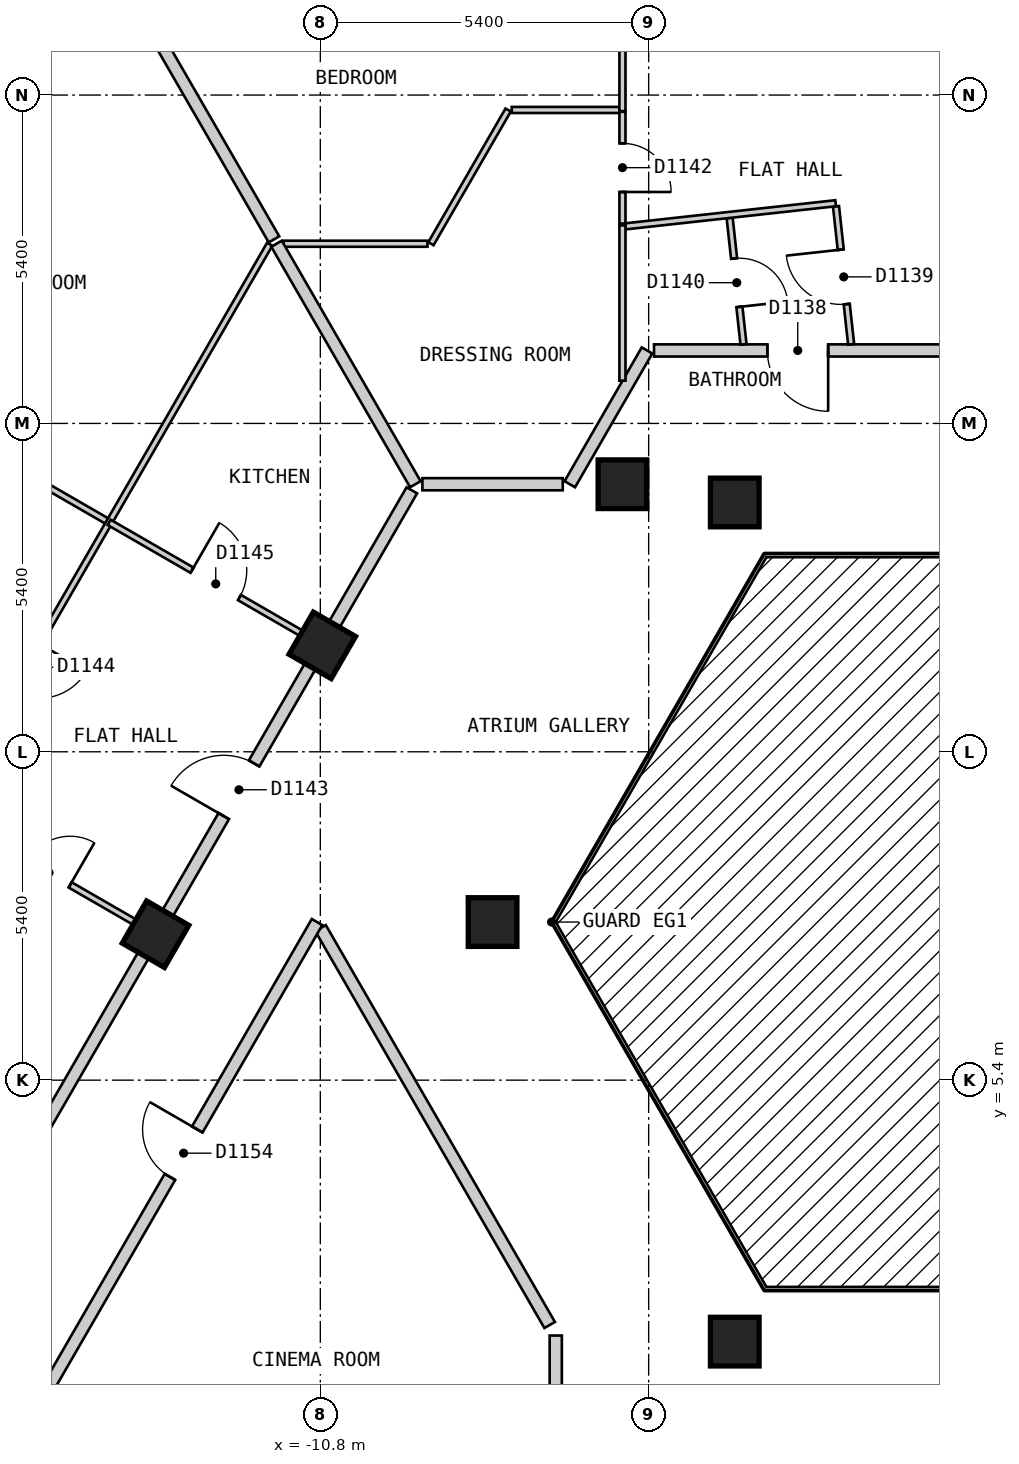
"""IFC4 building model, lengths in metres.
Left out: names, types, materials, properties, quantities, classifications, styles, units other than length and angle.
Written with IfcOpenShell. Run it as: python <this file> out.ifc"""

import sys

from ifc_helpers import new_model, si_unit, direction, frame, frame_2d, origin, origin_2d, place, context, subcontext, project, spatial, rectangle, extrude, element, fill, save


model = new_model("IFC4")
c1 = context("Model", 3, precision=1e-05, world=origin(), true_north=direction((0.0, 1.0)))
c2 = subcontext(c1, "Body", "Model", "MODEL_VIEW")
j1 = project(units=[si_unit("LENGTHUNIT", "METRE"), si_unit("PLANEANGLEUNIT", "RADIAN")], contexts=[c1])
p1 = place(None, origin())
s1 = spatial("IfcSite", under=j1, at=p1, CompositionType="ELEMENT")
p2 = place(p1, origin())
s2 = spatial("IfcBuilding", under=s1, at=p2, CompositionType="ELEMENT")
p3 = place(p2, frame((0.0, 0.0, 144.6)))
s3 = spatial("IfcBuildingStorey", under=s2, at=p3, CompositionType="ELEMENT", Elevation=144.6)
for number, where, z_axis, x_axis in (
    (1, (-3.984, 14.9, 0.0), (0.0, 0.0, 1.0), (1.0, 0.0, 0.0)),
    (2, (-5.831, 15.2, 0.0), (0.0, 0.0, 1.0), (-1.0, 0.0, 0.0)),
    (3, (-10.768, 12.55, 0.0), (0.0, 0.0, 1.0), (-0.5, -0.866, 0.0)),
    (4, (-7.967, 8.0, 0.0), (0.0, 0.0, 1.0), (1.0, 0.0, 0.0)),
    (5, (-13.51, 7.8, 0.0), (0.0, 0.0, 1.0), (-0.5, -0.866, 0.0)),
    (6, (-3.984, 1.1, 0.0), (0.0, 0.0, 1.0), (1.0, 0.0, 0.0)),
):
    element("IfcColumn", number, at=place(p3, frame(where, z_axis=z_axis, x_axis=x_axis)), inside=s3, PredefinedType="COLUMN", context=c2, shape_type="SweptSolid", body=[
        extrude(rectangle(XDim=0.8, YDim=0.8, at=origin_2d()), origin(), (0.0, 0.0, 1.0), 3.0),
    ])
p4 = place(p3, frame((-10.796, 7.9, 0.0), z_axis=(0.0, 0.0, 1.0), x_axis=(0.499954271211, -0.866051803703, 0.0)))
e7 = element("IfcWall", 7, at=p4, inside=s3, PredefinedType="PARTITIONING", context=c2, shape_type="SweptSolid", body=[
    extrude(rectangle(XDim=7.536, YDim=0.2, at=frame_2d((3.768, 0.0))), origin(), (0.0, 0.0, 1.0), 2.7),
])
p5 = place(p3, frame((-9.121, 15.2, 0.0), z_axis=(0.0, 0.0, 1.0), x_axis=(1.0, 0.0, 0.0)))
e8 = element("IfcWall", 8, at=p5, inside=s3, PredefinedType="PARTITIONING", context=c2, shape_type="SweptSolid", body=[
    extrude(rectangle(XDim=2.308, YDim=0.2, at=frame_2d((1.154, 0.0))), origin(), (0.0, 0.0, 1.0), 2.7),
])
p6 = place(p3, frame((-5.312, 17.4, 0.0), z_axis=(0.0, 0.0, 1.0), x_axis=(1.0, 0.0, 0.0)))
e9 = element("IfcWall", 9, at=p6, inside=s3, PredefinedType="PARTITIONING", context=c2, shape_type="SweptSolid", body=[
    extrude(rectangle(XDim=10.739, YDim=0.2, at=frame_2d((5.37, 0.0))), origin(), (0.0, 0.0, 1.0), 2.7),
])
p7 = place(p6, frame((7.538, 0.0, 0.0)))
e10 = element("IfcOpeningElement", 10, at=p7, cuts=e9, PredefinedType="OPENING", context=c2, shape_type="SweptSolid", body=[
    extrude(rectangle(XDim=1.0, YDim=2.1, at=frame_2d((0.5, 1.05))), frame((0.0, 0.11, 0.0), z_axis=(0.0, -1.0, 0.0), x_axis=(1.0, 0.0, 0.0)), (0.0, 0.0, 1.0), 0.22),
])
p8 = place(p6, frame((1.864, 0.0, 0.0)))
e11 = element("IfcOpeningElement", 11, at=p8, cuts=e9, PredefinedType="OPENING", context=c2, shape_type="SweptSolid", body=[
    extrude(rectangle(XDim=1.0, YDim=2.1, at=frame_2d((0.5, 1.05))), frame((0.0, 0.11, 0.0), z_axis=(0.0, -1.0, 0.0), x_axis=(1.0, 0.0, 0.0)), (0.0, 0.0, 1.0), 0.22),
])
p9 = place(p3, frame((-15.242, 0.399, 0.0), z_axis=(0.0, 0.0, 1.0), x_axis=(0.499953615651, 0.866052182145, 0.0)))
e12 = element("IfcWall", 12, at=p9, inside=s3, PredefinedType="PARTITIONING", context=c2, shape_type="SweptSolid", body=[
    extrude(rectangle(XDim=8.777, YDim=0.2, at=frame_2d((4.388, 0.0))), origin(), (0.0, 0.0, 1.0), 2.7),
])
p10 = place(p9, frame((3.938, 0.0, 0.0)))
e13 = element("IfcOpeningElement", 13, at=p10, cuts=e12, PredefinedType="OPENING", context=c2, shape_type="SweptSolid", body=[
    extrude(rectangle(XDim=0.9, YDim=2.1, at=frame_2d((0.45, 1.05))), frame((0.0, 0.11, 0.0), z_axis=(0.0, -1.0, 0.0), x_axis=(1.0, 0.0, 0.0)), (0.0, 0.0, 1.0), 0.22),
])
p11 = place(p3, frame((-6.697, 15.2, 0.0), z_axis=(0.0, 0.0, 1.0), x_axis=(0.499963722229, 0.866046347752, 0.0)))
e14 = element("IfcWall", 14, at=p11, inside=s3, PredefinedType="PARTITIONING", context=c2, shape_type="SweptSolid", body=[
    extrude(rectangle(XDim=2.54, YDim=0.2, at=frame_2d((1.27, 0.0))), origin(), (0.0, 0.0, 1.0), 2.7),
])
p12 = place(p3, frame((-17.724, 0.5, 0.0), z_axis=(0.0, 0.0, 1.0), x_axis=(0.499992388462, 0.866029798263, 0.0)))
e15 = element("IfcWall", 15, at=p12, inside=s3, PredefinedType="PARTITIONING", context=c2, shape_type="SweptSolid", body=[
    extrude(rectangle(XDim=16.859, YDim=0.2, at=frame_2d((8.429, 0.0))), origin(), (0.0, 0.0, 1.0), 2.7),
])
p13 = place(p12, frame((10.672, 0.0, 0.0)))
e16 = element("IfcOpeningElement", 16, at=p13, cuts=e15, PredefinedType="OPENING", context=c2, shape_type="SweptSolid", body=[
    extrude(rectangle(XDim=1.0, YDim=2.1, at=frame_2d((0.5, 1.05))), frame((0.0, 0.11, 0.0), z_axis=(0.0, -1.0, 0.0), x_axis=(1.0, 0.0, 0.0)), (0.0, 0.0, 1.0), 0.22),
])
p14 = place(p3, frame((-6.928, -2.8, 0.0), z_axis=(0.0, 0.0, 1.0), x_axis=(0.0, 1.0, 0.0)))
e17 = element("IfcWall", 17, at=p14, inside=s3, PredefinedType="PARTITIONING", context=c2, shape_type="SweptSolid", body=[
    extrude(rectangle(XDim=4.0, YDim=0.2, at=frame_2d((2.0, 0.0))), origin(), (0.0, 0.0, 1.0), 2.7),
])
p15 = place(p3, frame((-2.319, 19.77, 0.0), z_axis=(0.0, 0.0, 1.0), x_axis=(0.109046821538, -0.994036614372, 0.0)))
e18 = element("IfcWall", 18, at=p15, inside=s3, PredefinedType="PARTITIONING", context=c2, shape_type="SweptSolid", body=[
    extrude(rectangle(XDim=2.284, YDim=0.1, at=frame_2d((1.142, 0.0))), origin(), (0.0, 0.0, 1.0), 2.7),
])
p16 = place(p15, frame((0.717, 0.0, 0.0)))
e19 = element("IfcOpeningElement", 19, at=p16, cuts=e18, PredefinedType="OPENING", context=c2, shape_type="SweptSolid", body=[
    extrude(rectangle(XDim=0.9, YDim=2.1, at=frame_2d((0.45, 1.05))), frame((0.0, 0.06, 0.0), z_axis=(0.0, -1.0, 0.0), x_axis=(1.0, 0.0, 0.0)), (0.0, 0.0, 1.0), 0.12),
])
p17 = place(p3, frame((-4.068, 19.579, 0.0), z_axis=(0.0, 0.0, 1.0), x_axis=(0.109022161139, -0.994039319333, 0.0)))
e20 = element("IfcWall", 20, at=p17, inside=s3, PredefinedType="PARTITIONING", context=c2, shape_type="SweptSolid", body=[
    extrude(rectangle(XDim=2.092, YDim=0.1, at=frame_2d((1.046, 0.0))), origin(), (0.0, 0.0, 1.0), 2.7),
])
p18 = place(p17, frame((0.671, 0.0, 0.0)))
e21 = element("IfcOpeningElement", 21, at=p18, cuts=e20, PredefinedType="OPENING", context=c2, shape_type="SweptSolid", body=[
    extrude(rectangle(XDim=0.8, YDim=2.1, at=frame_2d((0.4, 1.05))), frame((0.0, 0.06, 0.0), z_axis=(0.0, -1.0, 0.0), x_axis=(1.0, 0.0, 0.0)), (0.0, 0.0, 1.0), 0.12),
])
p19 = place(p3, frame((-5.831, 21.325, 0.0), z_axis=(0.0, 0.0, 1.0), x_axis=(0.0, -1.0, 0.0)))
e22 = element("IfcWall", 22, at=p19, inside=s3, PredefinedType="PARTITIONING", context=c2, shape_type="SweptSolid", body=[
    extrude(rectangle(XDim=1.839, YDim=0.1, at=frame_2d((0.919, 0.0))), origin(), (0.0, 0.0, 1.0), 2.7),
])
p20 = place(p19, frame((0.519, 0.0, 0.0)))
e23 = element("IfcOpeningElement", 23, at=p20, cuts=e22, PredefinedType="OPENING", context=c2, shape_type="SweptSolid", body=[
    extrude(rectangle(XDim=0.8, YDim=2.1, at=frame_2d((0.4, 1.05))), frame((0.0, 0.06, 0.0), z_axis=(0.0, -1.0, 0.0), x_axis=(1.0, 0.0, 0.0)), (0.0, 0.0, 1.0), 0.12),
])
p21 = place(p3, frame((-16.971, 9.798, 0.0), z_axis=(0.0, 0.0, 1.0), x_axis=(0.866087525071, -0.499892387336, 0.0)))
e24 = element("IfcWall", 24, at=p21, inside=s3, PredefinedType="PARTITIONING", context=c2, shape_type="SweptSolid", body=[
    extrude(rectangle(XDim=3.897, YDim=0.1, at=frame_2d((1.948, 0.0))), origin(), (0.0, 0.0, 1.0), 2.7),
])
p22 = place(p21, frame((1.574, 0.0, 0.0)))
e25 = element("IfcOpeningElement", 25, at=p22, cuts=e24, PredefinedType="OPENING", context=c2, shape_type="SweptSolid", body=[
    extrude(rectangle(XDim=0.8, YDim=2.1, at=frame_2d((0.4, 1.05))), frame((0.0, 0.06, 0.0), z_axis=(0.0, -1.0, 0.0), x_axis=(1.0, 0.0, 0.0)), (0.0, 0.0, 1.0), 0.12),
])
p23 = place(p3, frame((-19.514, 17.599, 0.0), z_axis=(0.0, 0.0, 1.0), x_axis=(0.866007554612, -0.500030914399, 0.0)))
e26 = element("IfcWall", 26, at=p23, inside=s3, PredefinedType="PARTITIONING", context=c2, shape_type="SweptSolid", body=[
    extrude(rectangle(XDim=6.052, YDim=0.1, at=frame_2d((3.026, 0.0))), origin(), (0.0, 0.0, 1.0), 2.7),
])
p24 = place(p23, frame((2.576, 0.0, 0.0)))
e27 = element("IfcOpeningElement", 27, at=p24, cuts=e26, PredefinedType="OPENING", context=c2, shape_type="SweptSolid", body=[
    extrude(rectangle(XDim=0.9, YDim=2.1, at=frame_2d((0.45, 1.05))), frame((0.0, 0.06, 0.0), z_axis=(0.0, -1.0, 0.0), x_axis=(1.0, 0.0, 0.0)), (0.0, 0.0, 1.0), 0.12),
])
p25 = place(p3, frame((-11.405, 19.155, 0.0), z_axis=(0.0, 0.0, 1.0), x_axis=(1.0, 0.0, 0.0)))
e28 = element("IfcWall", 28, at=p25, inside=s3, PredefinedType="PARTITIONING", context=c2, shape_type="SweptSolid", body=[
    extrude(rectangle(XDim=2.367, YDim=0.1, at=frame_2d((1.184, 0.0))), origin(), (0.0, 0.0, 1.0), 2.7),
])
p26 = place(p3, frame((-7.652, 21.355, 0.0), z_axis=(0.0, 0.0, 1.0), x_axis=(1.0, 0.0, 0.0)))
e29 = element("IfcWall", 29, at=p26, inside=s3, PredefinedType="PARTITIONING", context=c2, shape_type="SweptSolid", body=[
    extrude(rectangle(XDim=1.771, YDim=0.1, at=frame_2d((0.885, 0.0))), origin(), (0.0, 0.0, 1.0), 2.7),
])
p27 = place(p3, frame((-8.981, 19.155, 0.0), z_axis=(0.0, 0.0, 1.0), x_axis=(0.500130227609, 0.865950203783, 0.0)))
e30 = element("IfcWall", 30, at=p27, inside=s3, PredefinedType="PARTITIONING", context=c2, shape_type="SweptSolid", body=[
    extrude(rectangle(XDim=2.539, YDim=0.1, at=frame_2d((1.27, 0.0))), origin(), (0.0, 0.0, 1.0), 2.7),
])
p28 = place(p3, frame((-22.398, 0.499, 0.0), z_axis=(0.0, 0.0, 1.0), x_axis=(0.499981561717, 0.866036048871, 0.0)))
e31 = element("IfcWall", 31, at=p28, inside=s3, PredefinedType="PARTITIONING", context=c2, shape_type="SweptSolid", body=[
    extrude(rectangle(XDim=21.532, YDim=0.1, at=frame_2d((10.766, 0.0))), origin(), (0.0, 0.0, 1.0), 2.7),
])
p29 = place(p28, frame((13.049, 0.0, 0.0)))
e32 = element("IfcOpeningElement", 32, at=p29, cuts=e31, PredefinedType="OPENING", context=c2, shape_type="SweptSolid", body=[
    extrude(rectangle(XDim=0.9, YDim=2.1, at=frame_2d((0.45, 1.05))), frame((0.0, 0.06, 0.0), z_axis=(0.0, -1.0, 0.0), x_axis=(1.0, 0.0, 0.0)), (0.0, 0.0, 1.0), 0.12),
])
p30 = place(p28, frame((2.183, 0.0, 0.0)))
e33 = element("IfcOpeningElement", 33, at=p30, cuts=e31, PredefinedType="OPENING", context=c2, shape_type="SweptSolid", body=[
    extrude(rectangle(XDim=0.8, YDim=2.1, at=frame_2d((0.4, 1.05))), frame((0.0, 0.06, 0.0), z_axis=(0.0, -1.0, 0.0), x_axis=(1.0, 0.0, 0.0)), (0.0, 0.0, 1.0), 0.12),
])
p31 = place(p3, frame((-5.781, 19.441, 0.0), z_axis=(0.0, 0.0, 1.0), x_axis=(0.994005576935, 0.109329378588, 0.0)))
e34 = element("IfcWall", 34, at=p31, inside=s3, PredefinedType="PARTITIONING", context=c2, shape_type="SweptSolid", body=[
    extrude(rectangle(XDim=3.477, YDim=0.1, at=frame_2d((1.738, 0.0))), origin(), (0.0, 0.0, 1.0), 2.7),
])
p32 = place(p3, frame((-5.831, 16.903, 0.0), z_axis=(0.0, 0.0, 1.0), x_axis=(0.0, 1.0, 0.0)))
e35 = element("IfcWall", 35, at=p32, inside=s3, PredefinedType="PARTITIONING", context=c2, shape_type="SweptSolid", body=[
    extrude(rectangle(XDim=2.553, YDim=0.1, at=frame_2d((1.276, 0.0))), origin(), (0.0, 0.0, 1.0), 2.7),
])
p33 = place(p3, frame((-5.831, 21.335, 0.0), z_axis=(0.0, 0.0, 1.0), x_axis=(0.0, 1.0, 0.0)))
e36 = element("IfcWall", 36, at=p33, inside=s3, PredefinedType="PARTITIONING", context=c2, shape_type="SweptSolid", body=[
    extrude(rectangle(XDim=3.965, YDim=0.1, at=frame_2d((1.982, 0.0))), origin(), (0.0, 0.0, 1.0), 2.7),
])
p34 = place(p33, frame((1.533, 0.0, 0.0)))
e37 = element("IfcOpeningElement", 37, at=p34, cuts=e36, PredefinedType="OPENING", context=c2, shape_type="SweptSolid", body=[
    extrude(rectangle(XDim=0.9, YDim=2.1, at=frame_2d((0.45, 1.05))), frame((0.0, 0.06, 0.0), z_axis=(0.0, -1.0, 0.0), x_axis=(1.0, 0.0, 0.0)), (0.0, 0.0, 1.0), 0.12),
])
p35 = place(p3, frame((-14.37, 24.09, 0.0), z_axis=(0.0, 0.0, 1.0), x_axis=(0.500057386422, -0.865992269183, 0.0)))
e38 = element("IfcWall", 38, at=p35, inside=s3, PredefinedType="PARTITIONING", context=c2, shape_type="SweptSolid", body=[
    extrude(rectangle(XDim=5.615, YDim=0.2, at=frame_2d((2.808, 0.0))), origin(), (0.0, 0.0, 1.0), 2.7),
])
p36 = place(p3, frame((-11.52, 19.155, 0.0), z_axis=(0.0, 0.0, 1.0), x_axis=(0.499916824138, -0.866073420066, 0.0)))
e39 = element("IfcWall", 39, at=p36, inside=s3, PredefinedType="PARTITIONING", context=c2, shape_type="SweptSolid", body=[
    extrude(rectangle(XDim=4.567, YDim=0.2, at=frame_2d((2.283, 0.0))), origin(), (0.0, 0.0, 1.0), 2.7),
])
p37 = place(p3, frame((-14.273, 14.573, 0.0), z_axis=(0.0, 0.0, 1.0), x_axis=(0.866138216955, -0.499804550929, 0.0)))
e40 = element("IfcWall", 40, at=p37, inside=s3, PredefinedType="PARTITIONING", context=c2, shape_type="SweptSolid", body=[
    extrude(rectangle(XDim=3.947, YDim=0.1, at=frame_2d((1.974, 0.0))), origin(), (0.0, 0.0, 1.0), 2.7),
])
p38 = place(p37, frame((1.574, 0.0, 0.0)))
e41 = element("IfcOpeningElement", 41, at=p38, cuts=e40, PredefinedType="OPENING", context=c2, shape_type="SweptSolid", body=[
    extrude(rectangle(XDim=0.9, YDim=2.1, at=frame_2d((0.45, 1.05))), frame((0.0, 0.06, 0.0), z_axis=(0.0, -1.0, 0.0), x_axis=(1.0, 0.0, 0.0)), (0.0, 0.0, 1.0), 0.12),
])
p39 = place(p8, origin())
e42 = element("IfcDoor", 42, at=p39, inside=s3, OperationType="SINGLE_SWING_RIGHT", PredefinedType="DOOR", context=c2, shape_type="SweptSolid", body=[
    extrude(rectangle(XDim=1.0, YDim=2.1, at=frame_2d((0.5, 1.05))), frame((0.0, 0.025, 0.0), z_axis=(0.0, -1.0, 0.0), x_axis=(1.0, 0.0, 0.0)), (0.0, 0.0, 1.0), 0.05),
])
fill(e11, e42)
p40 = place(p16, origin())
e43 = element("IfcDoor", 43, at=p40, inside=s3, OperationType="SINGLE_SWING_LEFT", PredefinedType="DOOR", context=c2, shape_type="SweptSolid", body=[
    extrude(rectangle(XDim=0.9, YDim=2.1, at=frame_2d((0.45, 1.05))), frame((0.0, 0.025, 0.0), z_axis=(0.0, -1.0, 0.0), x_axis=(1.0, 0.0, 0.0)), (0.0, 0.0, 1.0), 0.05),
])
fill(e19, e43)
p41 = place(p18, origin())
e44 = element("IfcDoor", 44, at=p41, inside=s3, OperationType="SINGLE_SWING_RIGHT", PredefinedType="DOOR", context=c2, shape_type="SweptSolid", body=[
    extrude(rectangle(XDim=0.8, YDim=2.1, at=frame_2d((0.4, 1.05))), frame((0.0, 0.025, 0.0), z_axis=(0.0, -1.0, 0.0), x_axis=(1.0, 0.0, 0.0)), (0.0, 0.0, 1.0), 0.05),
])
fill(e21, e44)
p42 = place(p20, origin())
e45 = element("IfcDoor", 45, at=p42, inside=s3, OperationType="SINGLE_SWING_RIGHT", PredefinedType="DOOR", context=c2, shape_type="SweptSolid", body=[
    extrude(rectangle(XDim=0.8, YDim=2.1, at=frame_2d((0.4, 1.05))), frame((0.0, 0.025, 0.0), z_axis=(0.0, -1.0, 0.0), x_axis=(1.0, 0.0, 0.0)), (0.0, 0.0, 1.0), 0.05),
])
fill(e23, e45)
p43 = place(p13, origin())
e46 = element("IfcDoor", 46, at=p43, inside=s3, OperationType="SINGLE_SWING_LEFT", PredefinedType="DOOR", context=c2, shape_type="SweptSolid", body=[
    extrude(rectangle(XDim=1.0, YDim=2.1, at=frame_2d((0.5, 1.05))), frame((0.0, 0.025, 0.0), z_axis=(0.0, -1.0, 0.0), x_axis=(1.0, 0.0, 0.0)), (0.0, 0.0, 1.0), 0.05),
])
fill(e16, e46)
p44 = place(p38, origin())
e47 = element("IfcDoor", 47, at=p44, inside=s3, OperationType="SINGLE_SWING_LEFT", PredefinedType="DOOR", context=c2, shape_type="SweptSolid", body=[
    extrude(rectangle(XDim=0.9, YDim=2.1, at=frame_2d((0.45, 1.05))), frame((0.0, 0.025, 0.0), z_axis=(0.0, -1.0, 0.0), x_axis=(1.0, 0.0, 0.0)), (0.0, 0.0, 1.0), 0.05),
])
fill(e41, e47)
p45 = place(p22, origin())
e48 = element("IfcDoor", 48, at=p45, inside=s3, OperationType="SINGLE_SWING_RIGHT", PredefinedType="DOOR", context=c2, shape_type="SweptSolid", body=[
    extrude(rectangle(XDim=0.8, YDim=2.1, at=frame_2d((0.4, 1.05))), frame((0.0, 0.025, 0.0), z_axis=(0.0, -1.0, 0.0), x_axis=(1.0, 0.0, 0.0)), (0.0, 0.0, 1.0), 0.05),
])
fill(e25, e48)
p46 = place(p10, origin())
e49 = element("IfcDoor", 49, at=p46, inside=s3, OperationType="SINGLE_SWING_RIGHT", PredefinedType="DOOR", context=c2, shape_type="SweptSolid", body=[
    extrude(rectangle(XDim=0.9, YDim=2.1, at=frame_2d((0.45, 1.05))), frame((0.0, 0.025, 0.0), z_axis=(0.0, -1.0, 0.0), x_axis=(1.0, 0.0, 0.0)), (0.0, 0.0, 1.0), 0.05),
])
fill(e13, e49)
save(model, sys.argv[1])
